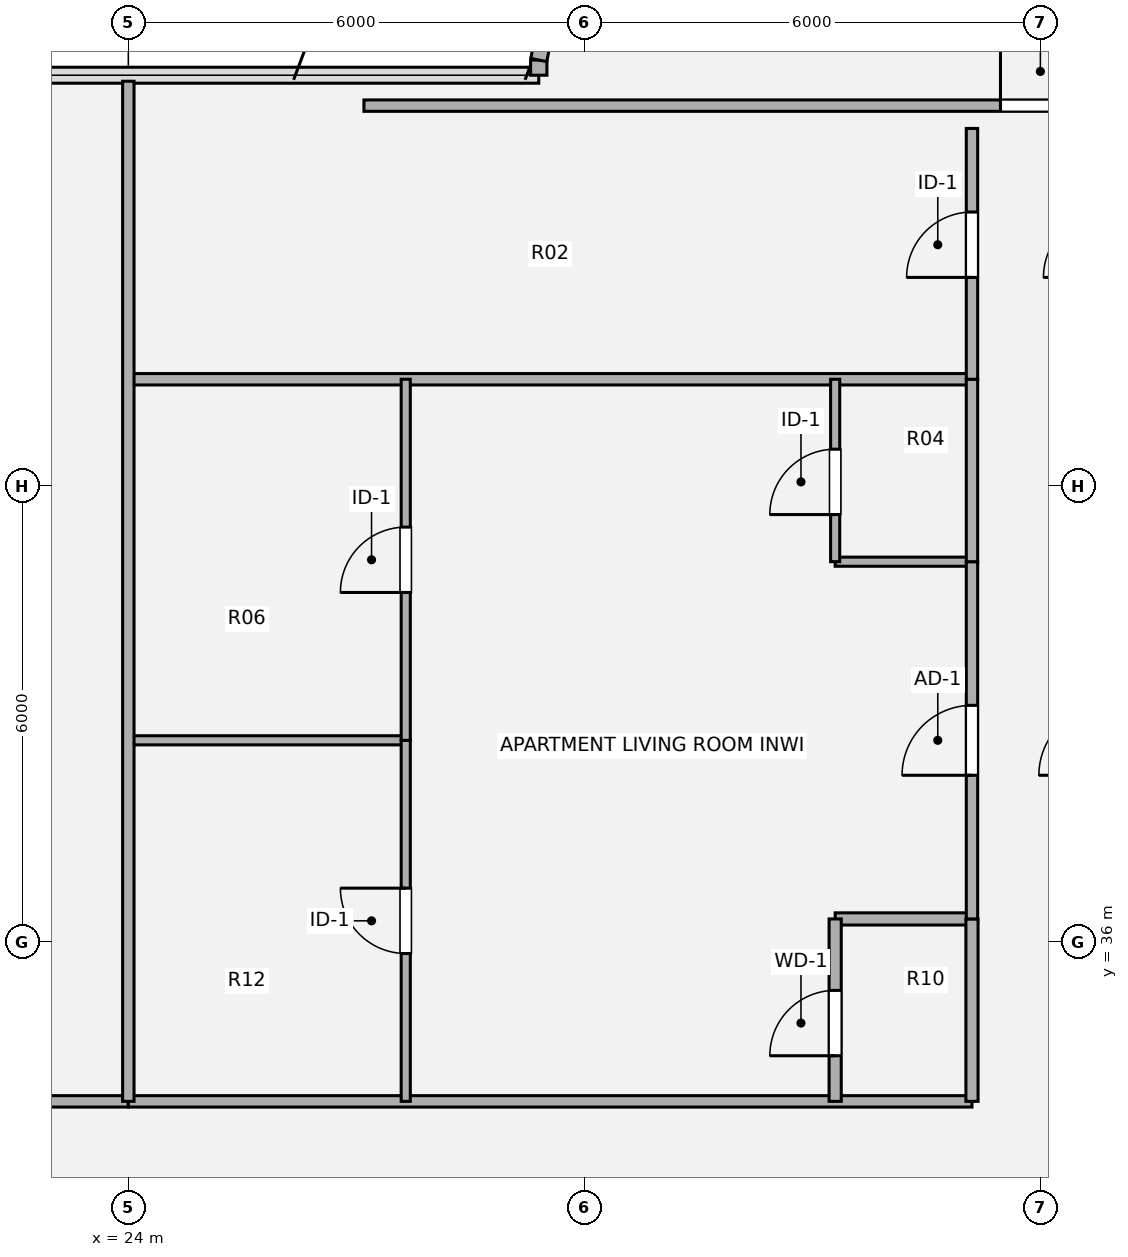
"""IFC4 building model, lengths in metres.
Left out: names, types, materials, properties, quantities, classifications, styles, units other than length and angle.
Written with IfcOpenShell. Run it as: python <this file> out.ifc"""

import sys

from ifc_helpers import new_model, si_unit, direction, frame, frame_2d, origin, origin_2d, place, context, subcontext, project, spatial, rectangle, extrude, source, transform, mapped, element, fill, save


model = new_model("IFC4")
c1 = context("Model", 3, precision=1e-05, world=origin(), true_north=direction((0.0, 1.0)))
c2 = subcontext(c1, "Body", "Model", "MODEL_VIEW")
j1 = project(units=[si_unit("LENGTHUNIT", "METRE"), si_unit("PLANEANGLEUNIT", "RADIAN")], contexts=[c1])
p1 = place(None, origin())
s1 = spatial("IfcSite", under=j1, at=p1, CompositionType="ELEMENT")
p2 = place(p1, origin())
s2 = spatial("IfcBuilding", under=s1, at=p2, CompositionType="ELEMENT")
p3 = place(p2, frame((0.0, 0.0, 93.6)))
s3 = spatial("IfcBuildingStorey", under=s2, at=p3, CompositionType="ELEMENT", Elevation=93.6)
p4 = place(p3, frame((29.4, 47.4, 0.0), z_axis=(0.0, 0.0, 1.0), x_axis=(0.0, 1.0, 0.0)))
e1 = element("IfcWall", 1, at=p4, inside=s3, PredefinedType="SOLIDWALL", context=c2, shape_type="SweptSolid", body=[
    extrude(rectangle(XDim=0.2, YDim=0.215, at=frame_2d((0.1, 0.0))), origin(), (0.0, 0.0, 1.0), 3.53),
])
p5 = place(p3, frame((29.4, 47.6, 0.0), z_axis=(0.0, 0.0, 1.0), x_axis=(0.195127417394, 0.980777900945, 0.0)))
e2 = element("IfcWall", 2, at=p5, inside=s3, PredefinedType="SOLIDWALL", context=c2, shape_type="SweptSolid", body=[
    extrude(rectangle(XDim=1.092, YDim=0.215, at=frame_2d((0.546, 0.0))), origin(), (0.0, 0.0, 1.0), 3.53),
])
p6 = place(p3, frame((13.98, 33.9, 0.0), z_axis=(0.0, 0.0, 1.0), x_axis=(1.0, 0.0, 0.0)))
e3 = element("IfcWall", 3, at=p6, inside=s3, PredefinedType="PARTITIONING", context=c2, shape_type="SweptSolid", body=[
    extrude(rectangle(XDim=10.02, YDim=0.15, at=frame_2d((5.01, 0.0))), origin(), (0.0, 0.0, 1.0), 2.982),
])
p7 = place(p6, frame((6.695, 0.0, 0.0)))
e4 = element("IfcOpeningElement", 4, at=p7, cuts=e3, PredefinedType="OPENING", context=c2, shape_type="SweptSolid", body=[
    extrude(rectangle(XDim=1.05, YDim=2.1, at=origin_2d()), frame((0.525, 0.085, 1.05), z_axis=(0.0, -1.0, 0.0), x_axis=(1.0, 0.0, 0.0)), (0.0, 0.0, 1.0), 0.17),
])
p8 = place(p3, frame((24.0, 33.9, 0.0), z_axis=(0.0, 0.0, 1.0), x_axis=(1.0, 0.0, 0.0)))
e5 = element("IfcWall", 5, at=p8, inside=s3, PredefinedType="PARTITIONING", context=c2, shape_type="SweptSolid", body=[
    extrude(rectangle(XDim=11.1, YDim=0.15, at=frame_2d((5.55, 0.0))), origin(), (0.0, 0.0, 1.0), 2.982),
])
p9 = place(p3, frame((33.3, 36.3, 0.0), z_axis=(0.0, 0.0, 1.0), x_axis=(1.0, 0.0, 0.0)))
e6 = element("IfcWall", 6, at=p9, inside=s3, PredefinedType="PLUMBINGWALL", context=c2, shape_type="SweptSolid", body=[
    extrude(rectangle(XDim=1.8, YDim=0.16, at=frame_2d((0.9, 0.0))), origin(), (0.0, 0.0, 1.0), 3.259),
])
p10 = place(p3, frame((24.0, 38.65, 0.0), z_axis=(0.0, 0.0, 1.0), x_axis=(1.0, 0.0, 0.0)))
e7 = element("IfcWall", 7, at=p10, inside=s3, PredefinedType="PARTITIONING", context=c2, shape_type="SweptSolid", body=[
    extrude(rectangle(XDim=3.65, YDim=0.12, at=frame_2d((1.825, 0.0))), origin(), (0.0, 0.0, 1.0), 2.903),
])
p11 = place(p3, frame((33.3, 41.0, 0.0), z_axis=(0.0, 0.0, 1.0), x_axis=(1.0, 0.0, 0.0)))
e8 = element("IfcWall", 8, at=p11, inside=s3, PredefinedType="PARTITIONING", context=c2, shape_type="SweptSolid", body=[
    extrude(rectangle(XDim=1.8, YDim=0.12, at=frame_2d((0.9, 0.0))), origin(), (0.0, 0.0, 1.0), 3.259),
])
p12 = place(p3, frame((24.0, 43.4, 0.0), z_axis=(0.0, 0.0, 1.0), x_axis=(1.0, 0.0, 0.0)))
e9 = element("IfcWall", 9, at=p12, inside=s3, PredefinedType="PARTITIONING", context=c2, shape_type="SweptSolid", body=[
    extrude(rectangle(XDim=11.1, YDim=0.15, at=frame_2d((5.55, 0.0))), origin(), (0.0, 0.0, 1.0), 3.308),
])
p13 = place(p3, frame((27.1, 47.0, 0.0), z_axis=(0.0, 0.0, 1.0), x_axis=(1.0, 0.0, 0.0)))
e10 = element("IfcWall", 10, at=p13, inside=s3, PredefinedType="PARTITIONING", context=c2, shape_type="SweptSolid", body=[
    extrude(rectangle(XDim=17.8, YDim=0.15, at=frame_2d((8.9, 0.0))), origin(), (0.0, 0.0, 1.0), 3.308),
])
p14 = place(p13, frame((8.375, 0.0, 0.0)))
e11 = element("IfcOpeningElement", 11, at=p14, cuts=e10, PredefinedType="OPENING", context=c2, shape_type="SweptSolid", body=[
    extrude(rectangle(XDim=1.05, YDim=2.1, at=origin_2d()), frame((0.525, 0.085, 1.05), z_axis=(0.0, -1.0, 0.0), x_axis=(1.0, 0.0, 0.0)), (0.0, 0.0, 1.0), 0.17),
])
p15 = place(p3, frame((24.0, 33.9, 0.0), z_axis=(0.0, 0.0, 1.0), x_axis=(0.0, 1.0, 0.0)))
e12 = element("IfcWall", 12, at=p15, inside=s3, PredefinedType="PARTITIONING", context=c2, shape_type="SweptSolid", body=[
    extrude(rectangle(XDim=13.421, YDim=0.15, at=frame_2d((6.71, 0.0))), origin(), (0.0, 0.0, 1.0), 3.5),
])
p16 = place(p3, frame((27.65, 33.9, 0.0), z_axis=(0.0, 0.0, 1.0), x_axis=(0.0, 1.0, 0.0)))
e13 = element("IfcWall", 13, at=p16, inside=s3, PredefinedType="PARTITIONING", context=c2, shape_type="SweptSolid", body=[
    extrude(rectangle(XDim=4.75, YDim=0.12, at=frame_2d((2.375, 0.0))), origin(), (0.0, 0.0, 1.0), 3.5),
])
p17 = place(p16, frame((1.945, 0.0, 0.0)))
e14 = element("IfcOpeningElement", 14, at=p17, cuts=e13, PredefinedType="OPENING", context=c2, shape_type="SweptSolid", body=[
    extrude(rectangle(XDim=0.86, YDim=2.1, at=origin_2d()), frame((0.43, 0.07, 1.05), z_axis=(0.0, -1.0, 0.0), x_axis=(1.0, 0.0, 0.0)), (0.0, 0.0, 1.0), 0.14),
])
p18 = place(p3, frame((27.65, 38.65, 0.0), z_axis=(0.0, 0.0, 1.0), x_axis=(0.0, 1.0, 0.0)))
e15 = element("IfcWall", 15, at=p18, inside=s3, PredefinedType="PARTITIONING", context=c2, shape_type="SweptSolid", body=[
    extrude(rectangle(XDim=4.75, YDim=0.12, at=frame_2d((2.375, 0.0))), origin(), (0.0, 0.0, 1.0), 3.5),
])
p19 = place(p18, frame((1.945, 0.0, 0.0)))
e16 = element("IfcOpeningElement", 16, at=p19, cuts=e15, PredefinedType="OPENING", context=c2, shape_type="SweptSolid", body=[
    extrude(rectangle(XDim=0.86, YDim=2.1, at=origin_2d()), frame((0.43, 0.07, 1.05), z_axis=(0.0, -1.0, 0.0), x_axis=(1.0, 0.0, 0.0)), (0.0, 0.0, 1.0), 0.14),
])
p20 = place(p3, frame((33.3, 33.9, 0.0), z_axis=(0.0, 0.0, 1.0), x_axis=(0.0, 1.0, 0.0)))
e17 = element("IfcWall", 17, at=p20, inside=s3, PredefinedType="PLUMBINGWALL", context=c2, shape_type="SweptSolid", body=[
    extrude(rectangle(XDim=2.4, YDim=0.16, at=frame_2d((1.2, 0.0))), origin(), (0.0, 0.0, 1.0), 3.5),
])
p21 = place(p20, frame((0.6, 0.0, 0.0)))
e18 = element("IfcOpeningElement", 18, at=p21, cuts=e17, PredefinedType="OPENING", context=c2, shape_type="SweptSolid", body=[
    extrude(rectangle(XDim=0.86, YDim=2.1, at=origin_2d()), frame((0.43, 0.09, 1.05), z_axis=(0.0, -1.0, 0.0), x_axis=(1.0, 0.0, 0.0)), (0.0, 0.0, 1.0), 0.18),
])
p22 = place(p3, frame((33.3, 41.0, 0.0), z_axis=(0.0, 0.0, 1.0), x_axis=(0.0, 1.0, 0.0)))
e19 = element("IfcWall", 19, at=p22, inside=s3, PredefinedType="PARTITIONING", context=c2, shape_type="SweptSolid", body=[
    extrude(rectangle(XDim=2.4, YDim=0.12, at=frame_2d((1.2, 0.0))), origin(), (0.0, 0.0, 1.0), 3.5),
])
p23 = place(p22, frame((0.62, 0.0, 0.0)))
e20 = element("IfcOpeningElement", 20, at=p23, cuts=e19, PredefinedType="OPENING", context=c2, shape_type="SweptSolid", body=[
    extrude(rectangle(XDim=0.86, YDim=2.1, at=origin_2d()), frame((0.43, 0.07, 1.05), z_axis=(0.0, -1.0, 0.0), x_axis=(1.0, 0.0, 0.0)), (0.0, 0.0, 1.0), 0.14),
])
p24 = place(p3, frame((35.1, 33.9, 0.0), z_axis=(0.0, 0.0, 1.0), x_axis=(0.0, 1.0, 0.0)))
e21 = element("IfcWall", 21, at=p24, inside=s3, PredefinedType="PLUMBINGWALL", context=c2, shape_type="SweptSolid", body=[
    extrude(rectangle(XDim=2.4, YDim=0.16, at=frame_2d((1.2, 0.0))), origin(), (0.0, 0.0, 1.0), 3.5),
])
p25 = place(p3, frame((35.1, 36.3, 0.0), z_axis=(0.0, 0.0, 1.0), x_axis=(0.0, 1.0, 0.0)))
e22 = element("IfcWall", 22, at=p25, inside=s3, PredefinedType="PARTITIONING", context=c2, shape_type="SweptSolid", body=[
    extrude(rectangle(XDim=4.7, YDim=0.15, at=frame_2d((2.35, 0.0))), origin(), (0.0, 0.0, 1.0), 3.5),
])
p26 = place(p25, frame((1.89, 0.0, 0.0)))
e23 = element("IfcOpeningElement", 23, at=p26, cuts=e22, PredefinedType="OPENING", context=c2, shape_type="SweptSolid", body=[
    extrude(rectangle(XDim=0.92, YDim=2.1, at=origin_2d()), frame((0.46, 0.085, 1.05), z_axis=(0.0, -1.0, 0.0), x_axis=(1.0, 0.0, 0.0)), (0.0, 0.0, 1.0), 0.17),
])
p27 = place(p3, frame((35.1, 41.0, 0.0), z_axis=(0.0, 0.0, 1.0), x_axis=(0.0, 1.0, 0.0)))
e24 = element("IfcWall", 24, at=p27, inside=s3, PredefinedType="PARTITIONING", context=c2, shape_type="SweptSolid", body=[
    extrude(rectangle(XDim=2.4, YDim=0.15, at=frame_2d((1.2, 0.0))), origin(), (0.0, 0.0, 1.0), 3.5),
])
p28 = place(p3, frame((35.1, 43.4, 0.0), z_axis=(0.0, 0.0, 1.0), x_axis=(0.0, 1.0, 0.0)))
e25 = element("IfcWall", 25, at=p28, inside=s3, PredefinedType="PARTITIONING", context=c2, shape_type="SweptSolid", body=[
    extrude(rectangle(XDim=3.3, YDim=0.15, at=frame_2d((1.65, 0.0))), origin(), (0.0, 0.0, 1.0), 3.5),
])
p29 = place(p28, frame((1.34, 0.0, 0.0)))
e26 = element("IfcOpeningElement", 26, at=p29, cuts=e25, PredefinedType="OPENING", context=c2, shape_type="SweptSolid", body=[
    extrude(rectangle(XDim=0.86, YDim=2.1, at=origin_2d()), frame((0.43, 0.085, 1.05), z_axis=(0.0, -1.0, 0.0), x_axis=(1.0, 0.0, 0.0)), (0.0, 0.0, 1.0), 0.17),
])
m1 = source(origin(), c2, "Body", "SweptSolid", [
    extrude(rectangle(XDim=1.05, YDim=2.1, at=origin_2d()), frame((0.525, 0.025, 1.05), z_axis=(0.0, -1.0, 0.0), x_axis=(1.0, 0.0, 0.0)), (0.0, 0.0, 1.0), 0.05),
])
p30 = place(p14, origin())
e27 = element("IfcDoor", 27, at=p30, inside=s3, OperationType="SINGLE_SWING_LEFT", PredefinedType="DOOR", context=c2, shape_type="MappedRepresentation", body=[
    mapped(m1, transform((0.0, 0.0, 0.0), x_axis=(1.0, 0.0, 0.0), y_axis=(0.0, 1.0, 0.0), z_axis=(0.0, 0.0, 1.0), scale=1.0)),
])
fill(e11, e27)
m2 = source(origin(), c2, "Body", "SweptSolid", [
    extrude(rectangle(XDim=0.86, YDim=2.1, at=origin_2d()), frame((0.43, 0.025, 1.05), z_axis=(0.0, -1.0, 0.0), x_axis=(1.0, 0.0, 0.0)), (0.0, 0.0, 1.0), 0.05),
])
p31 = place(p17, origin())
e28 = element("IfcDoor", 28, at=p31, inside=s3, OperationType="SINGLE_SWING_RIGHT", PredefinedType="DOOR", context=c2, shape_type="MappedRepresentation", body=[
    mapped(m2, transform((0.0, 0.0, 0.0), x_axis=(1.0, 0.0, 0.0), y_axis=(0.0, 1.0, 0.0), z_axis=(0.0, 0.0, 1.0), scale=1.0)),
])
fill(e14, e28)
p32 = place(p19, origin())
e29 = element("IfcDoor", 29, at=p32, inside=s3, OperationType="SINGLE_SWING_LEFT", PredefinedType="DOOR", context=c2, shape_type="MappedRepresentation", body=[
    mapped(m2, transform((0.0, 0.0, 0.0), x_axis=(1.0, 0.0, 0.0), y_axis=(0.0, 1.0, 0.0), z_axis=(0.0, 0.0, 1.0), scale=1.0)),
])
fill(e16, e29)
m3 = source(origin(), c2, "Body", "SweptSolid", [
    extrude(rectangle(XDim=0.86, YDim=2.1, at=origin_2d()), frame((0.43, 0.025, 1.05), z_axis=(0.0, -1.0, 0.0), x_axis=(1.0, 0.0, 0.0)), (0.0, 0.0, 1.0), 0.05),
])
p33 = place(p21, origin())
e30 = element("IfcDoor", 30, at=p33, inside=s3, OperationType="SINGLE_SWING_LEFT", PredefinedType="DOOR", context=c2, shape_type="MappedRepresentation", body=[
    mapped(m3, transform((0.0, 0.0, 0.0), x_axis=(1.0, 0.0, 0.0), y_axis=(0.0, 1.0, 0.0), z_axis=(0.0, 0.0, 1.0), scale=1.0)),
])
fill(e18, e30)
p34 = place(p23, origin())
e31 = element("IfcDoor", 31, at=p34, inside=s3, OperationType="SINGLE_SWING_LEFT", PredefinedType="DOOR", context=c2, shape_type="MappedRepresentation", body=[
    mapped(m2, transform((0.0, 0.0, 0.0), x_axis=(1.0, 0.0, 0.0), y_axis=(0.0, 1.0, 0.0), z_axis=(0.0, 0.0, 1.0), scale=1.0)),
])
fill(e20, e31)
m4 = source(origin(), c2, "Body", "SweptSolid", [
    extrude(rectangle(XDim=0.92, YDim=2.1, at=origin_2d()), frame((0.46, 0.025, 1.05), z_axis=(0.0, -1.0, 0.0), x_axis=(1.0, 0.0, 0.0)), (0.0, 0.0, 1.0), 0.05),
])
p35 = place(p26, origin())
e32 = element("IfcDoor", 32, at=p35, inside=s3, OperationType="SINGLE_SWING_LEFT", PredefinedType="DOOR", context=c2, shape_type="MappedRepresentation", body=[
    mapped(m4, transform((0.0, 0.0, 0.0), x_axis=(1.0, 0.0, 0.0), y_axis=(0.0, 1.0, 0.0), z_axis=(0.0, 0.0, 1.0), scale=1.0)),
])
fill(e23, e32)
p36 = place(p29, origin())
e33 = element("IfcDoor", 33, at=p36, inside=s3, OperationType="SINGLE_SWING_LEFT", PredefinedType="DOOR", context=c2, shape_type="MappedRepresentation", body=[
    mapped(m2, transform((0.0, 0.0, 0.0), x_axis=(1.0, 0.0, 0.0), y_axis=(0.0, 1.0, 0.0), z_axis=(0.0, 0.0, 1.0), scale=1.0)),
])
fill(e26, e33)
save(model, sys.argv[1])
